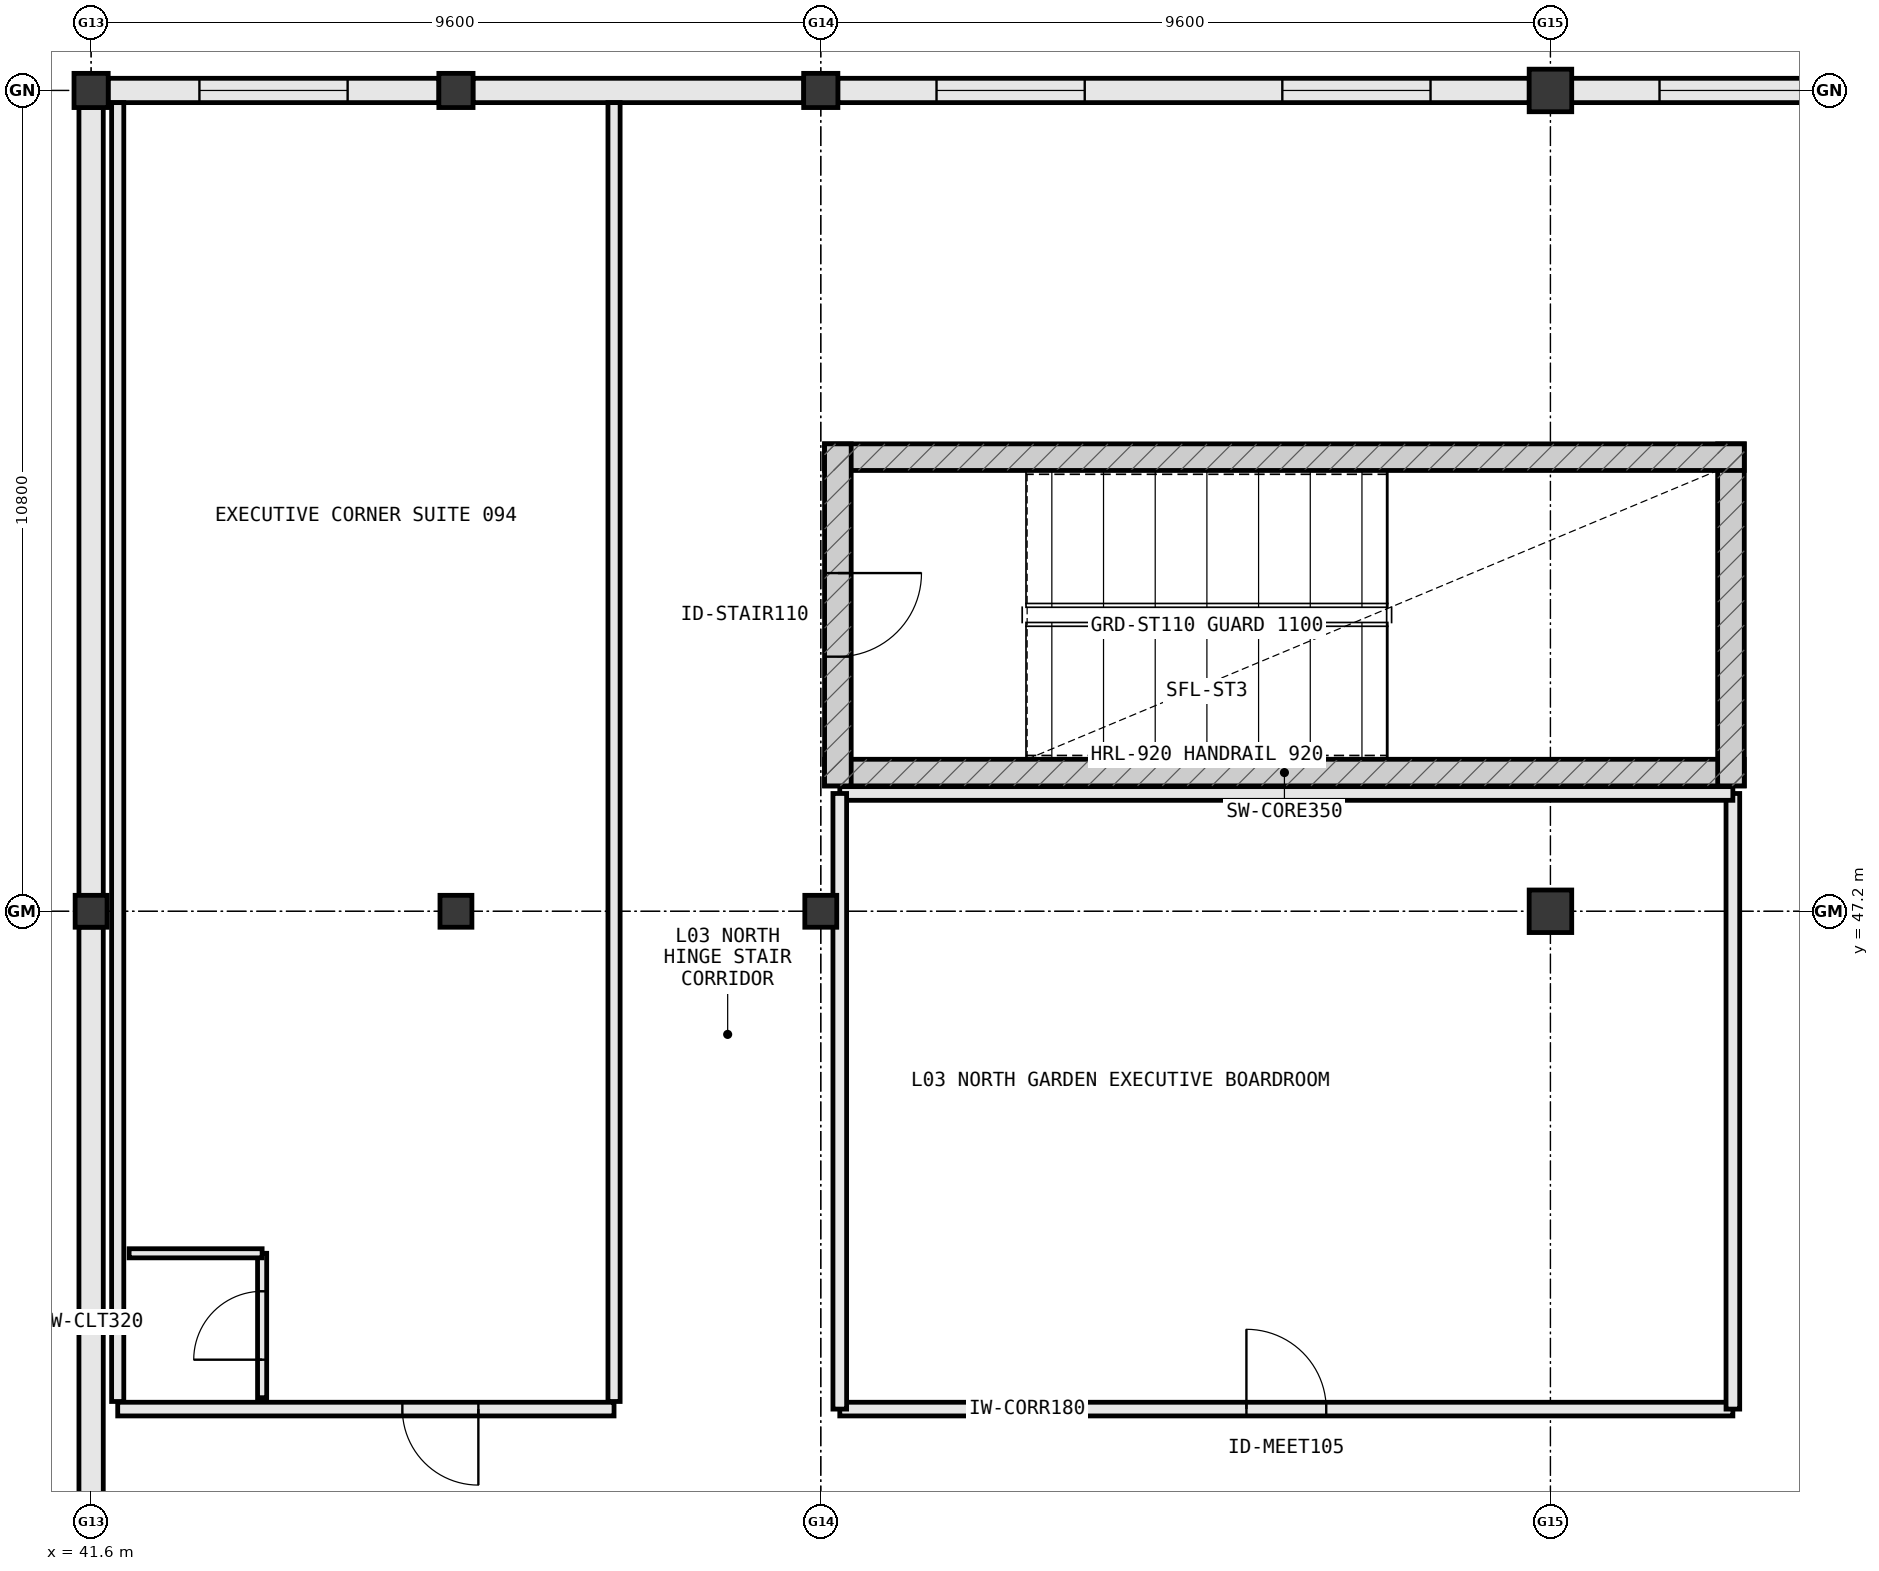
"""IFC4 building model, lengths in metres.
Left out: names, types, materials, properties, quantities, classifications, styles, units other than length and angle.
Written with IfcOpenShell. Run it as: python <this file> out.ifc"""

import sys

from ifc_helpers import new_model, si_unit, direction, frame, frame_2d, origin, origin_2d, place, context, subcontext, project, spatial, rectangle, i_section, extrude, element, fill, save


model = new_model("IFC4")
c1 = context("Model", 3, precision=1e-05, world=origin(), true_north=direction((0.0, 1.0)))
c2 = subcontext(c1, "Body", "Model", "MODEL_VIEW")
j1 = project(units=[si_unit("LENGTHUNIT", "METRE"), si_unit("PLANEANGLEUNIT", "RADIAN")], contexts=[c1])
p1 = place(None, origin())
s1 = spatial("IfcSite", under=j1, at=p1, CompositionType="ELEMENT")
p2 = place(p1, origin())
s2 = spatial("IfcBuilding", under=s1, at=p2, CompositionType="ELEMENT")
p3 = place(p2, frame((0.0, 0.0, 16.2)))
s3 = spatial("IfcBuildingStorey", under=s2, at=p3, CompositionType="ELEMENT", Elevation=16.2)
p4 = place(p3, frame((41.6, 58.0, 0.0), z_axis=(0.0, 0.0, 1.0), x_axis=(1.0, 0.0, 0.0)))
e1 = element("IfcColumn", 1, at=p4, inside=s3, PredefinedType="COLUMN", context=c2, shape_type="SweptSolid", body=[
    extrude(rectangle(XDim=0.45, YDim=0.45, at=origin_2d()), origin(), (0.0, 0.0, 1.0), 3.8),
])
p5 = place(p2, frame((0.0, 0.0, 10.8)))
s4 = spatial("IfcBuildingStorey", under=s2, at=p5, CompositionType="ELEMENT", Elevation=10.8)
p6 = place(p5, frame((41.6, 42.5, 0.0), z_axis=(0.0, 0.0, 1.0), x_axis=(1.0, 0.0, 0.0)))
e2 = element("IfcColumn", 2, at=p6, inside=s4, PredefinedType="COLUMN", context=c2, shape_type="SweptSolid", body=[
    extrude(i_section(OverallWidth=0.374, OverallDepth=0.372, WebThickness=0.016, FlangeThickness=0.026, at=origin_2d()), origin(), (0.0, 0.0, 1.0), 9.75),
])
p7 = place(p3, frame((41.6, 47.2, 0.0), z_axis=(0.0, 0.0, 1.0), x_axis=(1.0, 0.0, 0.0)))
e3 = element("IfcColumn", 3, at=p7, inside=s3, PredefinedType="COLUMN", context=c2, shape_type="SweptSolid", body=[
    extrude(rectangle(XDim=0.42, YDim=0.42, at=origin_2d()), origin(), (0.0, 0.0, 1.0), 3.8),
])
for number, where, z_axis, x_axis in (
    (4, (60.8, 47.2, 0.0), (0.0, 0.0, 1.0), (1.0, 0.0, 0.0)),
    (5, (60.8, 58.0, 0.0), (0.0, 0.0, 1.0), (1.0, 0.0, 0.0)),
):
    element("IfcColumn", number, at=place(p3, frame(where, z_axis=z_axis, x_axis=x_axis)), inside=s3, PredefinedType="COLUMN", context=c2, shape_type="SweptSolid", body=[
        extrude(rectangle(XDim=0.56, YDim=0.56, at=origin_2d()), origin(), (0.0, 0.0, 1.0), 3.8),
    ])
p8 = place(p3, frame((46.4, 47.2, 0.0), z_axis=(0.0, 0.0, 1.0), x_axis=(1.0, 0.0, 0.0)))
e6 = element("IfcColumn", 6, at=p8, inside=s3, PredefinedType="COLUMN", context=c2, shape_type="SweptSolid", body=[
    extrude(rectangle(XDim=0.42, YDim=0.42, at=origin_2d()), origin(), (0.0, 0.0, 1.0), 3.8),
])
p9 = place(p3, frame((46.4, 58.0, 0.0), z_axis=(0.0, 0.0, 1.0), x_axis=(1.0, 0.0, 0.0)))
e7 = element("IfcColumn", 7, at=p9, inside=s3, PredefinedType="COLUMN", context=c2, shape_type="SweptSolid", body=[
    extrude(rectangle(XDim=0.45, YDim=0.45, at=origin_2d()), origin(), (0.0, 0.0, 1.0), 3.8),
])
p10 = place(p3, frame((51.2, 47.2, 0.0), z_axis=(0.0, 0.0, 1.0), x_axis=(1.0, 0.0, 0.0)))
e8 = element("IfcColumn", 8, at=p10, inside=s3, PredefinedType="COLUMN", context=c2, shape_type="SweptSolid", body=[
    extrude(rectangle(XDim=0.42, YDim=0.42, at=origin_2d()), origin(), (0.0, 0.0, 1.0), 3.8),
])
p11 = place(p3, frame((51.2, 58.0, 0.0), z_axis=(0.0, 0.0, 1.0), x_axis=(1.0, 0.0, 0.0)))
e9 = element("IfcColumn", 9, at=p11, inside=s3, PredefinedType="COLUMN", context=c2, shape_type="SweptSolid", body=[
    extrude(rectangle(XDim=0.45, YDim=0.45, at=origin_2d()), origin(), (0.0, 0.0, 1.0), 3.8),
])
p12 = place(p3, frame((65.342, 58.0, 0.0), z_axis=(0.0, 0.0, 1.0), x_axis=(-1.0, 0.0, 0.0)))
e10 = element("IfcWall", 10, at=p12, inside=s3, PredefinedType="STANDARD", context=c2, shape_type="SweptSolid", body=[
    extrude(rectangle(XDim=4.264, YDim=0.32, at=frame_2d((2.132, 0.0))), origin(), (0.0, 0.0, 1.0), 2.875),
])
p13 = place(p12, frame((1.157, 0.0, 0.85)))
e11 = element("IfcOpeningElement", 11, at=p13, cuts=e10, PredefinedType="OPENING", context=c2, shape_type="SweptSolid", body=[
    extrude(rectangle(XDim=1.95, YDim=1.9, at=frame_2d((0.975, 0.95))), frame((0.0, 0.172, 0.0), z_axis=(0.0, -1.0, 0.0), x_axis=(1.0, 0.0, 0.0)), (0.0, 0.0, 1.0), 0.344),
])
p14 = place(p3, frame((60.522, 58.0, 0.0), z_axis=(0.0, 0.0, 1.0), x_axis=(-1.0, 0.0, 0.0)))
e12 = element("IfcWall", 12, at=p14, inside=s3, PredefinedType="STANDARD", context=c2, shape_type="SweptSolid", body=[
    extrude(rectangle(XDim=9.099, YDim=0.32, at=frame_2d((4.549, 0.0))), origin(), (0.0, 0.0, 1.0), 2.875),
])
p15 = place(p14, frame((1.3, 0.0, 0.85)))
e13 = element("IfcOpeningElement", 13, at=p15, cuts=e12, PredefinedType="OPENING", context=c2, shape_type="SweptSolid", body=[
    extrude(rectangle(XDim=1.95, YDim=1.9, at=frame_2d((0.975, 0.95))), frame((0.0, 0.172, 0.0), z_axis=(0.0, -1.0, 0.0), x_axis=(1.0, 0.0, 0.0)), (0.0, 0.0, 1.0), 0.344),
])
p16 = place(p14, frame((5.849, 0.0, 0.85)))
e14 = element("IfcOpeningElement", 14, at=p16, cuts=e12, PredefinedType="OPENING", context=c2, shape_type="SweptSolid", body=[
    extrude(rectangle(XDim=1.95, YDim=1.9, at=frame_2d((0.975, 0.95))), frame((0.0, 0.172, 0.0), z_axis=(0.0, -1.0, 0.0), x_axis=(1.0, 0.0, 0.0)), (0.0, 0.0, 1.0), 0.344),
])
p17 = place(p3, frame((50.977, 58.0, 0.0), z_axis=(0.0, 0.0, 1.0), x_axis=(-1.0, 0.0, 0.0)))
e15 = element("IfcWall", 15, at=p17, inside=s3, PredefinedType="STANDARD", context=c2, shape_type="SweptSolid", body=[
    extrude(rectangle(XDim=4.354, YDim=0.32, at=frame_2d((2.177, 0.0))), origin(), (0.0, 0.0, 1.0), 2.875),
])
p18 = place(p3, frame((46.177, 58.0, 0.0), z_axis=(0.0, 0.0, 1.0), x_axis=(-1.0, 0.0, 0.0)))
e16 = element("IfcWall", 16, at=p18, inside=s3, PredefinedType="STANDARD", context=c2, shape_type="SweptSolid", body=[
    extrude(rectangle(XDim=4.354, YDim=0.32, at=frame_2d((2.177, 0.0))), origin(), (0.0, 0.0, 1.0), 2.875),
])
p19 = place(p18, frame((1.202, 0.0, 0.85)))
e17 = element("IfcOpeningElement", 17, at=p19, cuts=e16, PredefinedType="OPENING", context=c2, shape_type="SweptSolid", body=[
    extrude(rectangle(XDim=1.95, YDim=1.9, at=frame_2d((0.975, 0.95))), frame((0.0, 0.172, 0.0), z_axis=(0.0, -1.0, 0.0), x_axis=(1.0, 0.0, 0.0)), (0.0, 0.0, 1.0), 0.344),
])
p20 = place(p3, frame((41.6, 57.777, 0.0), z_axis=(0.0, 0.0, 1.0), x_axis=(0.0, -1.0, 0.0)))
e18 = element("IfcWall", 18, at=p20, inside=s3, PredefinedType="STANDARD", context=c2, shape_type="SweptSolid", body=[
    extrude(rectangle(XDim=10.369, YDim=0.32, at=frame_2d((5.185, 0.0))), origin(), (0.0, 0.0, 1.0), 2.915),
])
p21 = place(p3, frame((41.6, 46.992, 0.0), z_axis=(0.0, 0.0, 1.0), x_axis=(0.0, -1.0, 0.0)))
e19 = element("IfcWall", 19, at=p21, inside=s3, PredefinedType="STANDARD", context=c2, shape_type="SweptSolid", body=[
    extrude(rectangle(XDim=10.384, YDim=0.32, at=frame_2d((5.192, 0.0))), origin(), (0.0, 0.0, 1.0), 2.915),
])
p22 = place(p3, frame((51.25, 49.025, 0.0), z_axis=(0.0, 0.0, 1.0), x_axis=(1.0, 0.0, 0.0)))
e20 = element("IfcWall", 20, at=p22, inside=s3, PredefinedType="SHEAR", context=c2, shape_type="SweptSolid", body=[
    extrude(rectangle(XDim=12.1, YDim=0.35, at=frame_2d((6.05, 0.0))), origin(), (0.0, 0.0, 1.0), 3.8),
])
p23 = place(p3, frame((63.175, 48.85, 0.0), z_axis=(0.0, 0.0, 1.0), x_axis=(0.0, 1.0, 0.0)))
e21 = element("IfcWall", 21, at=p23, inside=s3, PredefinedType="SHEAR", context=c2, shape_type="SweptSolid", body=[
    extrude(rectangle(XDim=4.5, YDim=0.35, at=frame_2d((2.25, 0.0))), origin(), (0.0, 0.0, 1.0), 3.8),
])
p24 = place(p3, frame((63.35, 53.175, 0.0), z_axis=(0.0, 0.0, 1.0), x_axis=(-1.0, 0.0, 0.0)))
e22 = element("IfcWall", 22, at=p24, inside=s3, PredefinedType="SHEAR", context=c2, shape_type="SweptSolid", body=[
    extrude(rectangle(XDim=12.1, YDim=0.35, at=frame_2d((6.05, 0.0))), origin(), (0.0, 0.0, 1.0), 3.8),
])
p25 = place(p3, frame((51.425, 53.35, 0.0), z_axis=(0.0, 0.0, 1.0), x_axis=(0.0, -1.0, 0.0)))
e23 = element("IfcWall", 23, at=p25, inside=s3, PredefinedType="SHEAR", context=c2, shape_type="SweptSolid", body=[
    extrude(rectangle(XDim=4.5, YDim=0.35, at=frame_2d((2.25, 0.0))), origin(), (0.0, 0.0, 1.0), 3.8),
])
p26 = place(p25, frame((1.7, 0.0, 0.0)))
e24 = element("IfcOpeningElement", 24, at=p26, cuts=e23, PredefinedType="OPENING", context=c2, shape_type="SweptSolid", body=[
    extrude(rectangle(XDim=1.1, YDim=2.2, at=frame_2d((0.55, 1.1))), frame((0.0, 0.187, 0.0), z_axis=(0.0, -1.0, 0.0), x_axis=(1.0, 0.0, 0.0)), (0.0, 0.0, 1.0), 0.374),
])
p27 = place(p3, frame((51.45, 40.65, 0.0), z_axis=(0.0, 0.0, 1.0), x_axis=(1.0, 0.0, 0.0)))
e25 = element("IfcWall", 25, at=p27, inside=s3, PredefinedType="PARTITIONING", context=c2, shape_type="SweptSolid", body=[
    extrude(rectangle(XDim=11.75, YDim=0.18, at=frame_2d((5.875, 0.0))), origin(), (0.0, 0.0, 1.0), 3.56),
])
p28 = place(p27, frame((5.35, 0.0, 0.0)))
e26 = element("IfcOpeningElement", 26, at=p28, cuts=e25, PredefinedType="OPENING", context=c2, shape_type="SweptSolid", body=[
    extrude(rectangle(XDim=1.05, YDim=2.2, at=frame_2d((0.525, 1.1))), frame((0.0, 0.102, 0.0), z_axis=(0.0, -1.0, 0.0), x_axis=(1.0, 0.0, 0.0)), (0.0, 0.0, 1.0), 0.204),
])
p29 = place(p3, frame((63.2, 40.65, 0.0), z_axis=(0.0, 0.0, 1.0), x_axis=(0.0, 1.0, 0.0)))
e27 = element("IfcWall", 27, at=p29, inside=s3, PredefinedType="PARTITIONING", context=c2, shape_type="SweptSolid", body=[
    extrude(rectangle(XDim=8.1, YDim=0.18, at=frame_2d((4.05, 0.0))), origin(), (0.0, 0.0, 1.0), 3.56),
])
p30 = place(p3, frame((63.2, 48.75, 0.0), z_axis=(0.0, 0.0, 1.0), x_axis=(-1.0, 0.0, 0.0)))
e28 = element("IfcWall", 28, at=p30, inside=s3, PredefinedType="PARTITIONING", context=c2, shape_type="SweptSolid", body=[
    extrude(rectangle(XDim=11.75, YDim=0.18, at=frame_2d((5.875, 0.0))), origin(), (0.0, 0.0, 1.0), 3.56),
])
p31 = place(p3, frame((51.45, 48.75, 0.0), z_axis=(0.0, 0.0, 1.0), x_axis=(0.0, -1.0, 0.0)))
e29 = element("IfcWall", 29, at=p31, inside=s3, PredefinedType="PARTITIONING", context=c2, shape_type="SweptSolid", body=[
    extrude(rectangle(XDim=8.1, YDim=0.18, at=frame_2d((4.05, 0.0))), origin(), (0.0, 0.0, 1.0), 2.915),
])
p32 = place(p3, frame((41.95, 40.65, 0.0), z_axis=(0.0, 0.0, 1.0), x_axis=(1.0, 0.0, 0.0)))
e30 = element("IfcWall", 30, at=p32, inside=s3, PredefinedType="PARTITIONING", context=c2, shape_type="SweptSolid", body=[
    extrude(rectangle(XDim=6.53, YDim=0.18, at=frame_2d((3.265, 0.0))), origin(), (0.0, 0.0, 1.0), 3.56),
])
p33 = place(p32, frame((3.745, 0.0, 0.0)))
e31 = element("IfcOpeningElement", 31, at=p33, cuts=e30, PredefinedType="OPENING", context=c2, shape_type="SweptSolid", body=[
    extrude(rectangle(XDim=1.0, YDim=2.2, at=frame_2d((0.5, 1.1))), frame((0.0, 0.102, 0.0), z_axis=(0.0, -1.0, 0.0), x_axis=(1.0, 0.0, 0.0)), (0.0, 0.0, 1.0), 0.204),
])
p34 = place(p3, frame((41.95, 40.75, 0.0), z_axis=(0.0, 0.0, 1.0), x_axis=(0.0, 1.0, 0.0)))
e32 = element("IfcWall", 32, at=p34, inside=s3, PredefinedType="PARTITIONING", context=c2, shape_type="SweptSolid", body=[
    extrude(rectangle(XDim=17.09, YDim=0.16, at=frame_2d((8.545, 0.0))), origin(), (0.0, 0.0, 1.0), 2.915),
])
p35 = place(p3, frame((48.48, 40.75, 0.0), z_axis=(0.0, 0.0, 1.0), x_axis=(0.0, 1.0, 0.0)))
e33 = element("IfcWall", 33, at=p35, inside=s3, PredefinedType="PARTITIONING", context=c2, shape_type="SweptSolid", body=[
    extrude(rectangle(XDim=17.09, YDim=0.16, at=frame_2d((8.545, 0.0))), origin(), (0.0, 0.0, 1.0), 3.06),
])
p36 = place(p3, frame((43.85, 40.8, 0.0), z_axis=(0.0, 0.0, 1.0), x_axis=(0.0, 1.0, 0.0)))
e34 = element("IfcWall", 34, at=p36, inside=s3, PredefinedType="PARTITIONING", context=c2, shape_type="SweptSolid", body=[
    extrude(rectangle(XDim=1.9, YDim=0.12, at=frame_2d((0.95, 0.0))), origin(), (0.0, 0.0, 1.0), 3.06),
])
p37 = place(p36, frame((0.5, 0.0, 0.0)))
e35 = element("IfcOpeningElement", 35, at=p37, cuts=e34, PredefinedType="OPENING", context=c2, shape_type="SweptSolid", body=[
    extrude(rectangle(XDim=0.9, YDim=2.15, at=frame_2d((0.45, 1.075))), frame((0.0, 0.072, 0.0), z_axis=(0.0, -1.0, 0.0), x_axis=(1.0, 0.0, 0.0)), (0.0, 0.0, 1.0), 0.144),
])
p38 = place(p3, frame((42.1, 42.7, 0.0), z_axis=(0.0, 0.0, 1.0), x_axis=(1.0, 0.0, 0.0)))
e36 = element("IfcWall", 36, at=p38, inside=s3, PredefinedType="PARTITIONING", context=c2, shape_type="SweptSolid", body=[
    extrude(rectangle(XDim=1.75, YDim=0.12, at=frame_2d((0.875, 0.0))), origin(), (0.0, 0.0, 1.0), 3.56),
])
p39 = place(p13, origin())
e37 = element("IfcWindow", 37, at=p39, inside=s3, PartitioningType="DOUBLE_PANEL_VERTICAL", PredefinedType="WINDOW", context=c2, shape_type="SweptSolid", body=[
    extrude(rectangle(XDim=1.95, YDim=1.9, at=frame_2d((0.975, 0.95))), frame((0.0, 0.03, 0.0), z_axis=(0.0, -1.0, 0.0), x_axis=(1.0, 0.0, 0.0)), (0.0, 0.0, 1.0), 0.06),
])
fill(e11, e37)
p40 = place(p15, origin())
e38 = element("IfcWindow", 38, at=p40, inside=s3, PartitioningType="DOUBLE_PANEL_VERTICAL", PredefinedType="WINDOW", context=c2, shape_type="SweptSolid", body=[
    extrude(rectangle(XDim=1.95, YDim=1.9, at=frame_2d((0.975, 0.95))), frame((0.0, 0.03, 0.0), z_axis=(0.0, -1.0, 0.0), x_axis=(1.0, 0.0, 0.0)), (0.0, 0.0, 1.0), 0.06),
])
fill(e13, e38)
p41 = place(p16, origin())
e39 = element("IfcWindow", 39, at=p41, inside=s3, PartitioningType="DOUBLE_PANEL_VERTICAL", PredefinedType="WINDOW", context=c2, shape_type="SweptSolid", body=[
    extrude(rectangle(XDim=1.95, YDim=1.9, at=frame_2d((0.975, 0.95))), frame((0.0, 0.03, 0.0), z_axis=(0.0, -1.0, 0.0), x_axis=(1.0, 0.0, 0.0)), (0.0, 0.0, 1.0), 0.06),
])
fill(e14, e39)
p42 = place(p19, origin())
e40 = element("IfcWindow", 40, at=p42, inside=s3, PartitioningType="DOUBLE_PANEL_VERTICAL", PredefinedType="WINDOW", context=c2, shape_type="SweptSolid", body=[
    extrude(rectangle(XDim=1.95, YDim=1.9, at=frame_2d((0.975, 0.95))), frame((0.0, 0.03, 0.0), z_axis=(0.0, -1.0, 0.0), x_axis=(1.0, 0.0, 0.0)), (0.0, 0.0, 1.0), 0.06),
])
fill(e17, e40)
p43 = place(p26, origin())
e41 = element("IfcDoor", 41, at=p43, inside=s3, OperationType="SINGLE_SWING_LEFT", PredefinedType="DOOR", context=c2, shape_type="SweptSolid", body=[
    extrude(rectangle(XDim=1.1, YDim=2.2, at=frame_2d((0.55, 1.1))), frame((0.0, 0.025, 0.0), z_axis=(0.0, -1.0, 0.0), x_axis=(1.0, 0.0, 0.0)), (0.0, 0.0, 1.0), 0.05),
])
fill(e24, e41)
p44 = place(p28, origin())
e42 = element("IfcDoor", 42, at=p44, inside=s3, OperationType="SINGLE_SWING_LEFT", PredefinedType="DOOR", context=c2, shape_type="SweptSolid", body=[
    extrude(rectangle(XDim=1.05, YDim=2.2, at=frame_2d((0.525, 1.1))), frame((0.0, 0.025, 0.0), z_axis=(0.0, -1.0, 0.0), x_axis=(1.0, 0.0, 0.0)), (0.0, 0.0, 1.0), 0.05),
])
fill(e26, e42)
p45 = place(p33, frame((1.0, 0.0, 0.0), z_axis=(0.0, 0.0, 1.0), x_axis=(-1.0, 0.0, 0.0)))
e43 = element("IfcDoor", 43, at=p45, inside=s3, OperationType="SINGLE_SWING_RIGHT", PredefinedType="DOOR", context=c2, shape_type="SweptSolid", body=[
    extrude(rectangle(XDim=1.0, YDim=2.2, at=frame_2d((0.5, 1.1))), frame((0.0, 0.025, 0.0), z_axis=(0.0, -1.0, 0.0), x_axis=(1.0, 0.0, 0.0)), (0.0, 0.0, 1.0), 0.05),
])
fill(e31, e43)
p46 = place(p37, origin())
e44 = element("IfcDoor", 44, at=p46, inside=s3, OperationType="SINGLE_SWING_LEFT", PredefinedType="DOOR", context=c2, shape_type="SweptSolid", body=[
    extrude(rectangle(XDim=0.9, YDim=2.15, at=frame_2d((0.45, 1.075))), frame((0.0, 0.025, 0.0), z_axis=(0.0, -1.0, 0.0), x_axis=(1.0, 0.0, 0.0)), (0.0, 0.0, 1.0), 0.05),
])
fill(e35, e44)
save(model, sys.argv[1])
